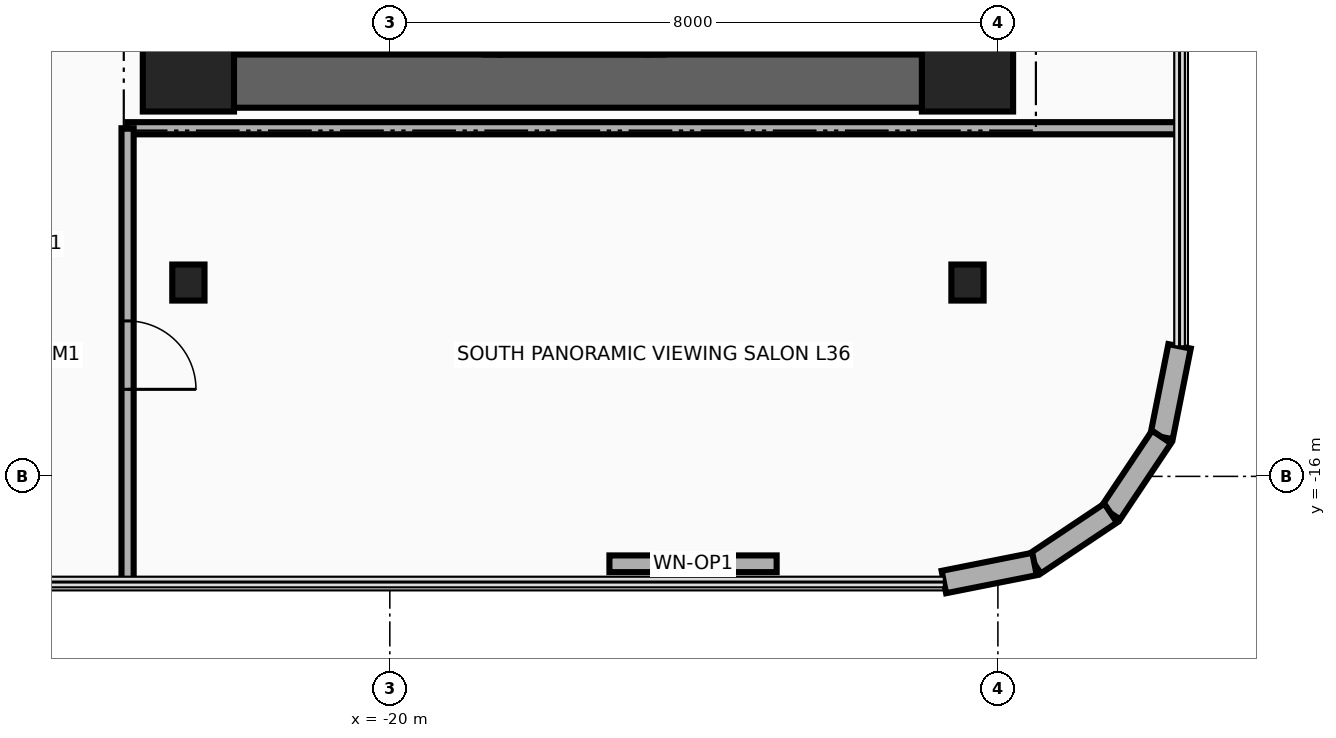
"""IFC4 building model, lengths in metres.
Left out: names, types, materials, properties, quantities, classifications, styles, units other than length and angle.
Written with IfcOpenShell. Run it as: python <this file> out.ifc"""

import sys

from ifc_helpers import new_model, si_unit, direction, frame, frame_2d, origin, origin_2d, place, context, subcontext, project, spatial, rectangle, i_section, extrude, source, transform, mapped, element, fill, save


model = new_model("IFC4")
c1 = context("Model", 3, precision=1e-05, world=origin(), true_north=direction((0.0, 1.0)))
c2 = subcontext(c1, "Body", "Model", "MODEL_VIEW")
j1 = project(units=[si_unit("LENGTHUNIT", "METRE"), si_unit("PLANEANGLEUNIT", "RADIAN")], contexts=[c1])
p1 = place(None, origin())
s1 = spatial("IfcSite", under=j1, at=p1, CompositionType="ELEMENT")
p2 = place(p1, origin())
s2 = spatial("IfcBuilding", under=s1, at=p2, CompositionType="ELEMENT")
p3 = place(p2, frame((0.0, 0.0, 142.7)))
s3 = spatial("IfcBuildingStorey", under=s2, at=p3, CompositionType="ELEMENT", Elevation=142.7)
for number, where, z_axis, x_axis in (
    (1, (-22.16, -10.45, 0.0), (0.0, 0.0, 1.0), (0.0, 1.0, 0.0)),
    (2, (-18.83, -10.45, 0.0), (0.0, 0.0, 1.0), (0.0, 1.0, 0.0)),
):
    element("IfcWall", number, at=place(p3, frame(where, z_axis=z_axis, x_axis=x_axis)), inside=s3, PredefinedType="SHEAR", context=c2, shape_type="SweptSolid", body=[
        extrude(rectangle(XDim=8.67, YDim=0.22, at=frame_2d((4.335, 0.0))), origin(), (0.0, 0.0, 1.0), 3.46),
    ])
p4 = place(p3, frame((-22.65, -11.15, 0.0), z_axis=(0.0, 0.0, 1.0), x_axis=(0.0, 1.0, 0.0)))
e3 = element("IfcWall", 3, at=p4, inside=s3, PredefinedType="SHEAR", context=c2, shape_type="SweptSolid", body=[
    extrude(rectangle(XDim=22.3, YDim=0.7, at=frame_2d((11.15, 0.0))), origin(), (0.0, 0.0, 1.0), 3.46),
])
p5 = place(p3, frame((-22.65, -10.8, 0.0), z_axis=(0.0, 0.0, 1.0), x_axis=(1.0, 0.0, 0.0)))
e4 = element("IfcWall", 4, at=p5, inside=s3, PredefinedType="SHEAR", context=c2, shape_type="SweptSolid", body=[
    extrude(rectangle(XDim=10.25, YDim=0.7, at=frame_2d((5.125, 0.0))), origin(), (0.0, 0.0, 1.0), 3.46),
])
m1 = source(origin(), c2, "Body", "SweptSolid", [
    extrude(rectangle(XDim=1.2, YDim=1.2, at=origin_2d()), origin(), (0.0, 0.0, 1.0), 3.7),
])
for number, where, z_axis, x_axis in (
    (5, (-22.65, -10.6, 0.0), (0.0, 0.0, 1.0), (1.0, 0.0, 0.0)),
    (6, (-12.4, -10.6, 0.0), (0.0, 0.0, 1.0), (1.0, 0.0, 0.0)),
):
    element("IfcColumn", number, at=place(p3, frame(where, z_axis=z_axis, x_axis=x_axis)), inside=s3, PredefinedType="COLUMN", context=c2, shape_type="MappedRepresentation", body=[
        mapped(m1, transform((0.0, 0.0, 0.0), x_axis=(1.0, 0.0, 0.0), y_axis=(0.0, 1.0, 0.0), z_axis=(0.0, 0.0, 1.0), scale=1.0)),
    ])
m2 = source(origin(), c2, "Body", "SweptSolid", [
    extrude(i_section(OverallWidth=0.424, OverallDepth=0.474, WebThickness=0.048, FlangeThickness=0.077, at=origin_2d()), origin(), (0.0, 0.0, 1.0), 3.7),
])
for number, where, z_axis, x_axis in (
    (7, (-22.65, -13.45, 0.0), (0.0, 0.0, 1.0), (1.0, 0.0, 0.0)),
    (8, (-12.4, -13.45, 0.0), (0.0, 0.0, 1.0), (1.0, 0.0, 0.0)),
):
    element("IfcColumn", number, at=place(p3, frame(where, z_axis=z_axis, x_axis=x_axis)), inside=s3, PredefinedType="COLUMN", context=c2, shape_type="MappedRepresentation", body=[
        mapped(m2, transform((0.0, 0.0, 0.0), x_axis=(1.0, 0.0, 0.0), y_axis=(0.0, 1.0, 0.0), z_axis=(0.0, 0.0, 1.0), scale=1.0)),
    ])
p6 = place(p3, frame((-9.61, -14.289, 0.0), z_axis=(0.0, 0.0, 1.0), x_axis=(-0.194996050505, -0.980804027463, 0.0)))
e9 = element("IfcWall", 9, at=p6, inside=s3, PredefinedType="SOLIDWALL", context=c2, shape_type="SweptSolid", body=[
    extrude(rectangle(XDim=1.216, YDim=0.3, at=frame_2d((0.608, 0.0))), origin(), (0.0, 0.0, 1.0), 3.46),
])
for number, where, z_axis, x_axis in (
    (10, (-9.847, -15.482, 0.0), (0.0, 0.0, 1.0), (-0.556, -0.831, 0.0)),
    (11, (-10.517, -16.483, 0.0), (0.0, 0.0, 1.0), (-0.831, -0.556, 0.0)),
):
    element("IfcWall", number, at=place(p3, frame(where, z_axis=z_axis, x_axis=x_axis)), inside=s3, PredefinedType="SOLIDWALL", context=c2, shape_type="SweptSolid", body=[
        extrude(rectangle(XDim=1.205, YDim=0.3, at=frame_2d((0.603, 0.0))), origin(), (0.0, 0.0, 1.0), 3.46),
    ])
p7 = place(p3, frame((-11.518, -17.153, 0.0), z_axis=(0.0, 0.0, 1.0), x_axis=(-0.980804027463, -0.194996050505, 0.0)))
e12 = element("IfcWall", 12, at=p7, inside=s3, PredefinedType="SOLIDWALL", context=c2, shape_type="SweptSolid", body=[
    extrude(rectangle(XDim=1.216, YDim=0.3, at=frame_2d((0.608, 0.0))), origin(), (0.0, 0.0, 1.0), 3.46),
])
p8 = place(p3, frame((-14.911, -17.15, 0.0), z_axis=(0.0, 0.0, 1.0), x_axis=(-1.0, 0.0, 0.0)))
e13 = element("IfcWall", 13, at=p8, inside=s3, PredefinedType="SOLIDWALL", context=c2, shape_type="SweptSolid", body=[
    extrude(rectangle(XDim=2.2, YDim=0.22, at=frame_2d((1.1, 0.0))), origin(), (0.0, 0.0, 1.0), 3.46),
])
p9 = place(p8, frame((0.65, 0.0, 0.95)))
e14 = element("IfcOpeningElement", 14, at=p9, cuts=e13, PredefinedType="OPENING", context=c2, shape_type="SweptSolid", body=[
    extrude(rectangle(XDim=0.9, YDim=1.3, at=frame_2d((0.45, 0.65))), frame((0.0, 0.125, 0.0), z_axis=(0.0, -1.0, 0.0), x_axis=(1.0, 0.0, 0.0)), (0.0, 0.0, 1.0), 0.25),
])
for number, where, z_axis, x_axis in (
    (15, (-18.65, -10.45, 0.0), (0.0, 0.0, 1.0), (0.0, 1.0, 0.0)),
    (16, (-16.5, -10.45, 0.0), (0.0, 0.0, 1.0), (0.0, 1.0, 0.0)),
):
    element("IfcWall", number, at=place(p3, frame(where, z_axis=z_axis, x_axis=x_axis)), inside=s3, PredefinedType="MOVABLE", context=c2, shape_type="SweptSolid", body=[
        extrude(rectangle(XDim=2.35, YDim=0.2, at=frame_2d((1.175, 0.0))), origin(), (0.0, 0.0, 1.0), 2.666),
    ])
p10 = place(p3, frame((-18.55, -10.35, 0.0), z_axis=(0.0, 0.0, 1.0), x_axis=(1.0, 0.0, 0.0)))
e17 = element("IfcWall", 17, at=p10, inside=s3, PredefinedType="MOVABLE", context=c2, shape_type="SweptSolid", body=[
    extrude(rectangle(XDim=1.95, YDim=0.2, at=frame_2d((0.975, 0.0))), origin(), (0.0, 0.0, 1.0), 2.666),
])
p11 = place(p3, frame((-23.45, -11.42, 0.0), z_axis=(0.0, 0.0, 1.0), x_axis=(1.0, 0.0, 0.0)))
e18 = element("IfcWall", 18, at=p11, inside=s3, PredefinedType="PARTITIONING", context=c2, shape_type="SweptSolid", body=[
    extrude(rectangle(XDim=13.84, YDim=0.16, at=frame_2d((6.92, 0.0))), origin(), (0.0, 0.0, 1.0), 2.834),
])
p12 = place(p3, frame((-23.45, -17.39, 0.0), z_axis=(0.0, 0.0, 1.0), x_axis=(0.0, 1.0, 0.0)))
e19 = element("IfcWall", 19, at=p12, inside=s3, PredefinedType="PARTITIONING", context=c2, shape_type="SweptSolid", body=[
    extrude(rectangle(XDim=5.97, YDim=0.16, at=frame_2d((2.985, 0.0))), origin(), (0.0, 0.0, 1.0), 3.46),
])
p13 = place(p12, frame((2.535, 0.0, 0.0)))
e20 = element("IfcOpeningElement", 20, at=p13, cuts=e19, PredefinedType="OPENING", context=c2, shape_type="SweptSolid", body=[
    extrude(rectangle(XDim=0.9, YDim=2.1, at=frame_2d((0.45, 1.05))), frame((0.0, 0.095, 0.0), z_axis=(0.0, -1.0, 0.0), x_axis=(1.0, 0.0, 0.0)), (0.0, 0.0, 1.0), 0.19),
])
p14 = place(p9, origin())
e21 = element("IfcWindow", 21, at=p14, inside=s3, PartitioningType="SINGLE_PANEL", PredefinedType="WINDOW", context=c2, shape_type="SweptSolid", body=[
    extrude(rectangle(XDim=0.9, YDim=1.3, at=frame_2d((0.45, 0.65))), frame((0.0, 0.03, 0.0), z_axis=(0.0, -1.0, 0.0), x_axis=(1.0, 0.0, 0.0)), (0.0, 0.0, 1.0), 0.06),
])
fill(e14, e21)
p15 = place(p13, frame((0.9, 0.0, 0.0), z_axis=(0.0, 0.0, 1.0), x_axis=(-1.0, 0.0, 0.0)))
e22 = element("IfcDoor", 22, at=p15, inside=s3, OperationType="SINGLE_SWING_LEFT", PredefinedType="DOOR", context=c2, shape_type="SweptSolid", body=[
    extrude(rectangle(XDim=0.9, YDim=2.1, at=frame_2d((0.45, 1.05))), frame((0.0, 0.025, 0.0), z_axis=(0.0, -1.0, 0.0), x_axis=(1.0, 0.0, 0.0)), (0.0, 0.0, 1.0), 0.05),
])
fill(e20, e22)
save(model, sys.argv[1])
